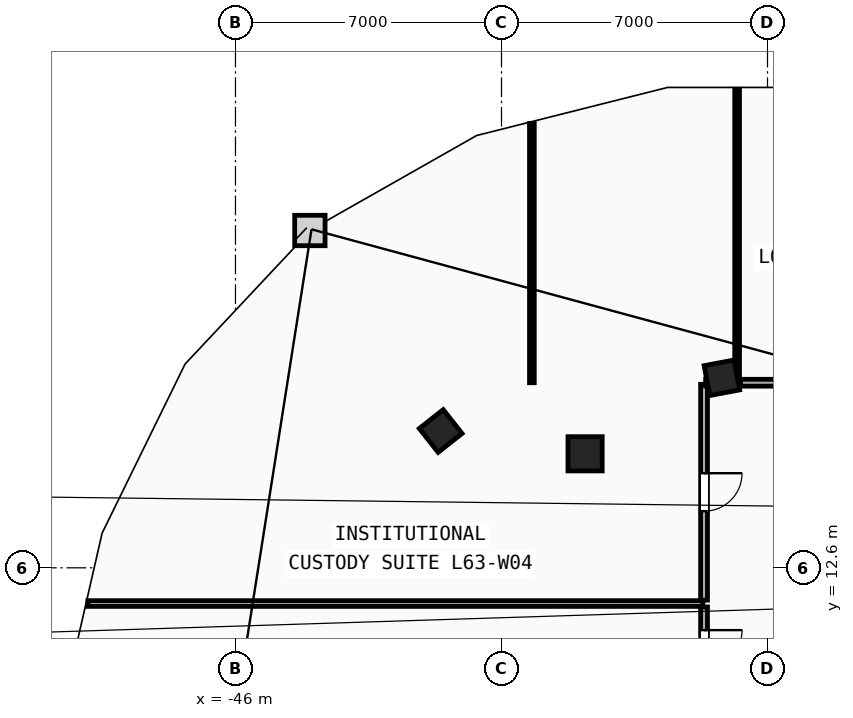
"""IFC4 building model, lengths in metres.
Left out: names, types, materials, properties, quantities, classifications, styles, units other than length and angle.
Written with IfcOpenShell. Run it as: python <this file> out.ifc"""

import sys

from ifc_helpers import new_model, si_unit, direction, frame, frame_2d, origin, origin_2d, place, context, subcontext, project, spatial, rectangle, extrude, element, fill, save


model = new_model("IFC4")
c1 = context("Model", 3, precision=1e-05, world=origin(), true_north=direction((0.0, 1.0)))
c2 = subcontext(c1, "Body", "Model", "MODEL_VIEW")
j1 = project(units=[si_unit("LENGTHUNIT", "METRE"), si_unit("PLANEANGLEUNIT", "RADIAN")], contexts=[c1])
p1 = place(None, origin())
s1 = spatial("IfcSite", under=j1, at=p1, CompositionType="ELEMENT")
p2 = place(p1, origin())
s2 = spatial("IfcBuilding", under=s1, at=p2, CompositionType="ELEMENT")
p3 = place(p2, frame((0.0, 0.0, 239.6)))
s3 = spatial("IfcBuildingStorey", under=s2, at=p3, CompositionType="ELEMENT", Elevation=239.6)
p4 = place(p3, frame((-36.8, 15.6, 0.0), z_axis=(0.0, 0.0, 1.0), x_axis=(1.0, 0.0, 0.0)))
e1 = element("IfcColumn", 1, at=p4, inside=s3, PredefinedType="COLUMN", context=c2, shape_type="SweptSolid", body=[
    extrude(rectangle(XDim=0.9, YDim=0.9, at=origin_2d()), origin(), (0.0, 0.0, 1.0), 3.6),
])
for number, where, z_axis, x_axis in (
    (2, (-33.2, 17.6, 0.0), (0.0, 0.0, 1.0), (-0.983, -0.186, 0.0)),
    (3, (-40.6, 16.2, 0.0), (0.0, 0.0, 1.0), (-0.785, -0.619, 0.0)),
):
    element("IfcColumn", number, at=place(p3, frame(where, z_axis=z_axis, x_axis=x_axis)), inside=s3, PredefinedType="COLUMN", context=c2, shape_type="SweptSolid", body=[
        extrude(rectangle(XDim=0.8, YDim=0.8, at=origin_2d()), origin(), (0.0, 0.0, 1.0), 3.6),
    ])
p5 = place(p3, frame((-49.883, 11.66, 0.0), z_axis=(0.0, 0.0, 1.0), x_axis=(1.0, 0.0, 0.0)))
e4 = element("IfcWall", 4, at=p5, inside=s3, PredefinedType="PARTITIONING", context=c2, shape_type="SweptSolid", body=[
    extrude(rectangle(XDim=16.183, YDim=0.15, at=frame_2d((8.091, 0.0))), origin(), (0.0, 0.0, 1.0), 3.34),
])
p6 = place(p3, frame((-38.2, 17.47, 0.0), z_axis=(0.0, 0.0, 1.0), x_axis=(0.0, 1.0, 0.0)))
e5 = element("IfcWall", 5, at=p6, inside=s3, PredefinedType="PARTITIONING", context=c2, shape_type="SweptSolid", body=[
    extrude(rectangle(XDim=6.82, YDim=0.125, at=frame_2d((3.41, 0.0))), origin(), (0.0, 0.0, 1.0), 3.34),
])
p7 = place(p3, frame((-32.8, 17.5, 0.0), z_axis=(0.0, 0.0, 1.0), x_axis=(0.0, 1.0, 0.0)))
e6 = element("IfcWall", 6, at=p7, inside=s3, PredefinedType="PARTITIONING", context=c2, shape_type="SweptSolid", body=[
    extrude(rectangle(XDim=7.69, YDim=0.125, at=frame_2d((3.845, 0.0))), origin(), (0.0, 0.0, 1.0), 3.34),
])
p8 = place(p3, frame((-33.67, 11.57, 0.0), z_axis=(0.0, 0.0, 1.0), x_axis=(0.0, -1.0, 0.0)))
e7 = element("IfcWall", 7, at=p8, inside=s3, PredefinedType="PARTITIONING", context=c2, shape_type="SweptSolid", body=[
    extrude(rectangle(XDim=2.219, YDim=0.18, at=frame_2d((1.109, 0.0))), origin(), (0.0, 0.0, 1.0), 3.34),
])
p9 = place(p8, frame((0.609, 0.0, 0.0)))
e8 = element("IfcOpeningElement", 8, at=p9, cuts=e7, PredefinedType="OPENING", context=c2, shape_type="SweptSolid", body=[
    extrude(rectangle(XDim=1.0, YDim=2.15, at=frame_2d((0.5, 1.075))), frame((0.0, 0.1, 0.0), z_axis=(0.0, -1.0, 0.0), x_axis=(1.0, 0.0, 0.0)), (0.0, 0.0, 1.0), 0.2),
])
p10 = place(p3, frame((-33.67, 17.428, 0.0), z_axis=(0.0, 0.0, 1.0), x_axis=(0.0, -1.0, 0.0)))
e9 = element("IfcWall", 9, at=p10, inside=s3, PredefinedType="PARTITIONING", context=c2, shape_type="SweptSolid", body=[
    extrude(rectangle(XDim=5.678, YDim=0.18, at=frame_2d((2.839, 0.0))), origin(), (0.0, 0.0, 1.0), 3.34),
])
p11 = place(p10, frame((2.339, 0.0, 0.0)))
e10 = element("IfcOpeningElement", 10, at=p11, cuts=e9, PredefinedType="OPENING", context=c2, shape_type="SweptSolid", body=[
    extrude(rectangle(XDim=1.0, YDim=2.15, at=frame_2d((0.5, 1.075))), frame((0.0, 0.1, 0.0), z_axis=(0.0, -1.0, 0.0), x_axis=(1.0, 0.0, 0.0)), (0.0, 0.0, 1.0), 0.2),
])
p12 = place(p3, frame((-32.89, 17.47, 0.0), z_axis=(0.0, 0.0, 1.0), x_axis=(-1.0, 0.0, 0.0)))
e11 = element("IfcWall", 11, at=p12, inside=s3, PredefinedType="PARTITIONING", context=c2, shape_type="SweptSolid", body=[
    extrude(rectangle(XDim=0.739, YDim=0.18, at=frame_2d((0.369, 0.0))), origin(), (0.0, 0.0, 1.0), 3.34),
])
p13 = place(p3, frame((-27.49, 17.47, 0.0), z_axis=(0.0, 0.0, 1.0), x_axis=(-1.0, 0.0, 0.0)))
e12 = element("IfcWall", 12, at=p13, inside=s3, PredefinedType="PARTITIONING", context=c2, shape_type="SweptSolid", body=[
    extrude(rectangle(XDim=5.22, YDim=0.18, at=frame_2d((2.61, 0.0))), origin(), (0.0, 0.0, 1.0), 3.34),
])
p14 = place(p13, frame((1.81, 0.0, 0.0)))
e13 = element("IfcOpeningElement", 13, at=p14, cuts=e12, PredefinedType="OPENING", context=c2, shape_type="SweptSolid", body=[
    extrude(rectangle(XDim=1.6, YDim=2.2, at=frame_2d((0.8, 1.1))), frame((0.0, 0.1, 0.0), z_axis=(0.0, -1.0, 0.0), x_axis=(1.0, 0.0, 0.0)), (0.0, 0.0, 1.0), 0.2),
])
p15 = place(p11, origin())
e14 = element("IfcDoor", 14, at=p15, inside=s3, OperationType="SINGLE_SWING_LEFT", PredefinedType="DOOR", context=c2, shape_type="SweptSolid", body=[
    extrude(rectangle(XDim=1.0, YDim=2.15, at=frame_2d((0.5, 1.075))), frame((0.0, 0.025, 0.0), z_axis=(0.0, -1.0, 0.0), x_axis=(1.0, 0.0, 0.0)), (0.0, 0.0, 1.0), 0.05),
])
fill(e10, e14)
p16 = place(p9, origin())
e15 = element("IfcDoor", 15, at=p16, inside=s3, OperationType="SINGLE_SWING_LEFT", PredefinedType="DOOR", context=c2, shape_type="SweptSolid", body=[
    extrude(rectangle(XDim=1.0, YDim=2.15, at=frame_2d((0.5, 1.075))), frame((0.0, 0.025, 0.0), z_axis=(0.0, -1.0, 0.0), x_axis=(1.0, 0.0, 0.0)), (0.0, 0.0, 1.0), 0.05),
])
fill(e8, e15)
save(model, sys.argv[1])
